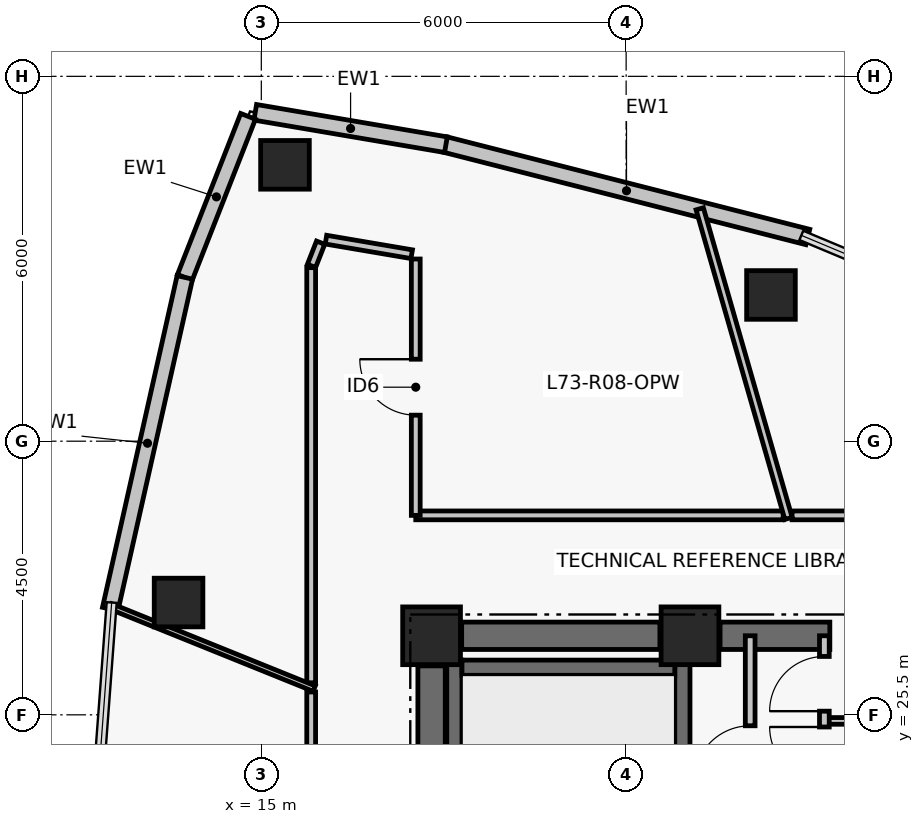
"""IFC4 building model, lengths in metres.
Left out: names, types, materials, properties, quantities, classifications, styles, units other than length and angle.
Written with IfcOpenShell. Run it as: python <this file> out.ifc"""

import sys

from ifc_helpers import new_model, si_unit, direction, frame, frame_2d, origin, origin_2d, place, context, subcontext, project, spatial, rectangle, hollow_rectangle, extrude, element, fill, save


model = new_model("IFC4")
c1 = context("Model", 3, precision=1e-05, world=origin(), true_north=direction((0.0, 1.0)))
c2 = subcontext(c1, "Body", "Model", "MODEL_VIEW")
j1 = project(units=[si_unit("LENGTHUNIT", "METRE"), si_unit("PLANEANGLEUNIT", "RADIAN")], contexts=[c1])
p1 = place(None, origin())
s1 = spatial("IfcSite", under=j1, at=p1, CompositionType="ELEMENT")
p2 = place(p1, origin())
s2 = spatial("IfcBuilding", under=s1, at=p2, CompositionType="ELEMENT")
p3 = place(p2, frame((0.0, 0.0, 288.06)))
s3 = spatial("IfcBuildingStorey", under=s2, at=p3, CompositionType="ELEMENT", Elevation=288.06)
for number, where, z_axis, x_axis in (
    (1, (17.8, 26.8, 0.0), (0.0, 0.0, 1.0), (1.0, 0.0, 0.0)),
    (2, (22.05, 26.8, 0.0), (0.0, 0.0, 1.0), (1.0, 0.0, 0.0)),
):
    element("IfcColumn", number, at=place(p3, frame(where, z_axis=z_axis, x_axis=x_axis)), inside=s3, PredefinedType="COLUMN", context=c2, shape_type="SweptSolid", body=[
        extrude(rectangle(XDim=0.95, YDim=0.95, at=origin_2d()), origin(), (0.0, 0.0, 1.0), 3.72),
    ])
p4 = place(p3, frame((18.295, 26.8, 0.0), z_axis=(0.0, 0.0, 1.0), x_axis=(1.0, 0.0, 0.0)))
e3 = element("IfcWall", 3, at=p4, inside=s3, PredefinedType="SHEAR", context=c2, shape_type="SweptSolid", body=[
    extrude(rectangle(XDim=3.26, YDim=0.45, at=frame_2d((1.63, 0.0))), origin(), (0.0, 0.0, 1.0), 3.5),
])
p5 = place(p3, frame((22.545, 26.8, 0.0), z_axis=(0.0, 0.0, 1.0), x_axis=(1.0, 0.0, 0.0)))
e4 = element("IfcWall", 4, at=p5, inside=s3, PredefinedType="SHEAR", context=c2, shape_type="SweptSolid", body=[
    extrude(rectangle(XDim=1.805, YDim=0.45, at=frame_2d((0.903, 0.0))), origin(), (0.0, 0.0, 1.0), 3.5),
])
p6 = place(p3, frame((17.8, 17.695, 0.0), z_axis=(0.0, 0.0, 1.0), x_axis=(0.0, 1.0, 0.0)))
e5 = element("IfcWall", 5, at=p6, inside=s3, PredefinedType="SHEAR", context=c2, shape_type="SweptSolid", body=[
    extrude(rectangle(XDim=8.61, YDim=0.45, at=frame_2d((4.305, 0.0))), origin(), (0.0, 0.0, 1.0), 3.5),
])
p7 = place(p3, frame((18.175, 17.6, 0.0), z_axis=(0.0, 0.0, 1.0), x_axis=(0.0, 1.0, 0.0)))
e6 = element("IfcWall", 6, at=p7, inside=s3, PredefinedType="SHEAR", context=c2, shape_type="SweptSolid", body=[
    extrude(rectangle(XDim=8.8, YDim=0.25, at=frame_2d((4.4, 0.0))), origin(), (0.0, 0.0, 1.0), 3.5),
])
p8 = place(p3, frame((21.925, 17.6, 0.0), z_axis=(0.0, 0.0, 1.0), x_axis=(0.0, 1.0, 0.0)))
e7 = element("IfcWall", 7, at=p8, inside=s3, PredefinedType="SHEAR", context=c2, shape_type="SweptSolid", body=[
    extrude(rectangle(XDim=8.8, YDim=0.25, at=frame_2d((4.4, 0.0))), origin(), (0.0, 0.0, 1.0), 3.5),
])
p9 = place(p8, frame((0.35, 0.0, 0.0)))
e8 = element("IfcOpeningElement", 8, at=p9, cuts=e7, PredefinedType="OPENING", context=c2, shape_type="SweptSolid", body=[
    extrude(rectangle(XDim=1.05, YDim=2.08, at=frame_2d((0.525, 1.04))), frame((0.0, 0.135, 0.0), z_axis=(0.0, -1.0, 0.0), x_axis=(1.0, 0.0, 0.0)), (0.0, 0.0, 1.0), 0.27),
])
p10 = place(p3, frame((18.3, 26.275, 0.0), z_axis=(0.0, 0.0, 1.0), x_axis=(1.0, 0.0, 0.0)))
e9 = element("IfcWall", 9, at=p10, inside=s3, PredefinedType="SHEAR", context=c2, shape_type="SweptSolid", body=[
    extrude(rectangle(XDim=3.5, YDim=0.25, at=frame_2d((1.75, 0.0))), origin(), (0.0, 0.0, 1.0), 3.5),
])
for number, where, z_axis, x_axis in (
    (10, (23.382, 32.405, 0.0), (0.0, 0.0, 1.0), (1.0, 0.0, 0.0)),
    (11, (15.389, 34.545, 0.0), (0.0, 0.0, 1.0), (1.0, 0.0, 0.0)),
    (12, (13.639, 27.347, 0.0), (0.0, 0.0, 1.0), (1.0, 0.0, 0.0)),
):
    element("IfcColumn", number, at=place(p3, frame(where, z_axis=z_axis, x_axis=x_axis)), inside=s3, PredefinedType="COLUMN", context=c2, shape_type="SweptSolid", body=[
        extrude(hollow_rectangle(XDim=0.8, YDim=0.8, WallThickness=0.035, at=origin_2d()), origin(), (0.0, 0.0, 1.0), 3.72),
    ])
p11 = place(p3, frame((18.024, 34.879, 0.0), z_axis=(0.0, 0.0, 1.0), x_axis=(0.968988278672, -0.247106689096, 0.0)))
e13 = element("IfcWall", 13, at=p11, inside=s3, PredefinedType="PARTITIONING", context=c2, shape_type="SweptSolid", body=[
    extrude(rectangle(XDim=6.154, YDim=0.26, at=frame_2d((3.077, 0.0))), origin(), (0.0, 0.0, 1.0), 3.5),
])
p12 = place(p3, frame((14.9, 35.409, 0.0), z_axis=(0.0, 0.0, 1.0), x_axis=(0.985889432766, -0.167397808709, 0.0)))
e14 = element("IfcWall", 14, at=p12, inside=s3, PredefinedType="PARTITIONING", context=c2, shape_type="SweptSolid", body=[
    extrude(rectangle(XDim=3.181, YDim=0.26, at=frame_2d((1.59, 0.0))), origin(), (0.0, 0.0, 1.0), 3.5),
])
p13 = place(p3, frame((13.742, 32.693, 0.0), z_axis=(0.0, 0.0, 1.0), x_axis=(0.36559927932, 0.930772349697, 0.0)))
e15 = element("IfcWall", 15, at=p13, inside=s3, PredefinedType="PARTITIONING", context=c2, shape_type="SweptSolid", body=[
    extrude(rectangle(XDim=2.845, YDim=0.26, at=frame_2d((1.423, 0.0))), origin(), (0.0, 0.0, 1.0), 3.5),
])
p14 = place(p3, frame((12.515, 27.24, 0.0), z_axis=(0.0, 0.0, 1.0), x_axis=(0.219500763731, 0.97561232809, 0.0)))
e16 = element("IfcWall", 16, at=p14, inside=s3, PredefinedType="PARTITIONING", context=c2, shape_type="SweptSolid", body=[
    extrude(rectangle(XDim=5.59, YDim=0.26, at=frame_2d((2.795, 0.0))), origin(), (0.0, 0.0, 1.0), 3.5),
])
p15 = place(p3, frame((23.04, 23.5, 0.0), z_axis=(0.0, 0.0, 1.0), x_axis=(0.0, 1.0, 0.0)))
e17 = element("IfcWall", 17, at=p15, inside=s3, PredefinedType="PARTITIONING", context=c2, shape_type="SweptSolid", body=[
    extrude(rectangle(XDim=3.3, YDim=0.16, at=frame_2d((1.65, 0.0))), origin(), (0.0, 0.0, 1.0), 2.63),
])
p16 = place(p15, frame((0.9, 0.0, 0.0)))
e18 = element("IfcOpeningElement", 18, at=p16, cuts=e17, PredefinedType="OPENING", context=c2, shape_type="SweptSolid", body=[
    extrude(rectangle(XDim=0.92, YDim=2.05, at=frame_2d((0.46, 1.025))), frame((0.0, 0.09, 0.0), z_axis=(0.0, -1.0, 0.0), x_axis=(1.0, 0.0, 0.0)), (0.0, 0.0, 1.0), 0.18),
])
p17 = place(p3, frame((24.26, 25.4, 0.0), z_axis=(0.0, 0.0, 1.0), x_axis=(1.0, 0.0, 0.0)))
e19 = element("IfcWall", 19, at=p17, inside=s3, PredefinedType="PARTITIONING", context=c2, shape_type="SweptSolid", body=[
    extrude(rectangle(XDim=4.76, YDim=0.11, at=frame_2d((2.38, 0.0))), origin(), (0.0, 0.0, 1.0), 3.5),
])
p18 = place(p3, frame((24.26, 24.24, 0.0), z_axis=(0.0, 0.0, 1.0), x_axis=(0.0, 1.0, 0.0)))
e20 = element("IfcWall", 20, at=p18, inside=s3, PredefinedType="PARTITIONING", context=c2, shape_type="SweptSolid", body=[
    extrude(rectangle(XDim=2.56, YDim=0.16, at=frame_2d((1.28, 0.0))), origin(), (0.0, 0.0, 1.0), 2.63),
])
p19 = place(p18, frame((0.16, 0.0, 0.0)))
e21 = element("IfcOpeningElement", 21, at=p19, cuts=e20, PredefinedType="OPENING", context=c2, shape_type="SweptSolid", body=[
    extrude(rectangle(XDim=0.9, YDim=2.02, at=frame_2d((0.45, 1.01))), frame((0.0, 0.09, 0.0), z_axis=(0.0, -1.0, 0.0), x_axis=(1.0, 0.0, 0.0)), (0.0, 0.0, 1.0), 0.18),
])
p20 = place(p18, frame((1.32, 0.0, 0.0)))
e22 = element("IfcOpeningElement", 22, at=p20, cuts=e20, PredefinedType="OPENING", context=c2, shape_type="SweptSolid", body=[
    extrude(rectangle(XDim=0.9, YDim=2.02, at=frame_2d((0.45, 1.01))), frame((0.0, 0.09, 0.0), z_axis=(0.0, -1.0, 0.0), x_axis=(1.0, 0.0, 0.0)), (0.0, 0.0, 1.0), 0.18),
])
p21 = place(p3, frame((15.82, 25.876, 0.0), z_axis=(0.0, 0.0, 1.0), x_axis=(0.0, -1.0, 0.0)))
e23 = element("IfcWall", 23, at=p21, inside=s3, PredefinedType="PARTITIONING", context=c2, shape_type="SweptSolid", body=[
    extrude(rectangle(XDim=9.442, YDim=0.145, at=frame_2d((4.721, 0.0))), origin(), (0.0, 0.0, 1.0), 2.83),
])
p22 = place(p21, frame((3.254, 0.0, 0.0)))
e24 = element("IfcOpeningElement", 24, at=p22, cuts=e23, PredefinedType="OPENING", context=c2, shape_type="SweptSolid", body=[
    extrude(rectangle(XDim=0.95, YDim=2.06, at=frame_2d((0.475, 1.03))), frame((0.0, 0.083, 0.0), z_axis=(0.0, -1.0, 0.0), x_axis=(1.0, 0.0, 0.0)), (0.0, 0.0, 1.0), 0.165),
])
p23 = place(p3, frame((28.5, 28.78, 0.0), z_axis=(0.0, 0.0, 1.0), x_axis=(-1.0, 0.0, 0.0)))
e25 = element("IfcWall", 25, at=p23, inside=s3, PredefinedType="PARTITIONING", context=c2, shape_type="SweptSolid", body=[
    extrude(rectangle(XDim=4.771, YDim=0.145, at=frame_2d((2.386, 0.0))), origin(), (0.0, 0.0, 1.0), 3.5),
])
p24 = place(p23, frame((2.318, 0.0, 0.0)))
e26 = element("IfcOpeningElement", 26, at=p24, cuts=e25, PredefinedType="OPENING", context=c2, shape_type="SweptSolid", body=[
    extrude(rectangle(XDim=0.95, YDim=2.06, at=frame_2d((0.475, 1.03))), frame((0.0, 0.083, 0.0), z_axis=(0.0, -1.0, 0.0), x_axis=(1.0, 0.0, 0.0)), (0.0, 0.0, 1.0), 0.165),
])
p25 = place(p3, frame((23.583, 28.78, 0.0), z_axis=(0.0, 0.0, 1.0), x_axis=(-1.0, 0.0, 0.0)))
e27 = element("IfcWall", 27, at=p25, inside=s3, PredefinedType="PARTITIONING", context=c2, shape_type="SweptSolid", body=[
    extrude(rectangle(XDim=6.043, YDim=0.145, at=frame_2d((3.021, 0.0))), origin(), (0.0, 0.0, 1.0), 2.83),
])
p26 = place(p3, frame((17.54, 28.78, 0.0), z_axis=(0.0, 0.0, 1.0), x_axis=(0.0, 1.0, 0.0)))
e28 = element("IfcWall", 28, at=p26, inside=s3, PredefinedType="PARTITIONING", context=c2, shape_type="SweptSolid", body=[
    extrude(rectangle(XDim=4.216, YDim=0.145, at=frame_2d((2.108, 0.0))), origin(), (0.0, 0.0, 1.0), 3.13),
])
p27 = place(p26, frame((1.648, 0.0, 0.0)))
e29 = element("IfcOpeningElement", 29, at=p27, cuts=e28, PredefinedType="OPENING", context=c2, shape_type="SweptSolid", body=[
    extrude(rectangle(XDim=0.92, YDim=2.05, at=frame_2d((0.46, 1.025))), frame((0.0, 0.083, 0.0), z_axis=(0.0, -1.0, 0.0), x_axis=(1.0, 0.0, 0.0)), (0.0, 0.0, 1.0), 0.165),
])
p28 = place(p3, frame((17.473, 33.075, 0.0), z_axis=(0.0, 0.0, 1.0), x_axis=(-0.985881780308, 0.167442871621, 0.0)))
e30 = element("IfcWall", 30, at=p28, inside=s3, PredefinedType="PARTITIONING", context=c2, shape_type="SweptSolid", body=[
    extrude(rectangle(XDim=1.43, YDim=0.145, at=frame_2d((0.715, 0.0))), origin(), (0.0, 0.0, 1.0), 3.13),
])
p29 = place(p3, frame((15.975, 33.265, 0.0), z_axis=(0.0, 0.0, 1.0), x_axis=(-0.365633948196, -0.930758731319, 0.0)))
e31 = element("IfcWall", 31, at=p29, inside=s3, PredefinedType="PARTITIONING", context=c2, shape_type="SweptSolid", body=[
    extrude(rectangle(XDim=0.41, YDim=0.145, at=frame_2d((0.205, 0.0))), origin(), (0.0, 0.0, 1.0), 2.83),
])
p30 = place(p3, frame((15.82, 32.854, 0.0), z_axis=(0.0, 0.0, 1.0), x_axis=(0.0, -1.0, 0.0)))
e32 = element("IfcWall", 32, at=p30, inside=s3, PredefinedType="PARTITIONING", context=c2, shape_type="SweptSolid", body=[
    extrude(rectangle(XDim=6.827, YDim=0.145, at=frame_2d((3.414, 0.0))), origin(), (0.0, 0.0, 1.0), 2.83),
])
p31 = place(p3, frame((23.67, 28.73, 0.0), z_axis=(0.0, 0.0, 1.0), x_axis=(-0.275646373744, 0.961259110044, 0.0)))
e33 = element("IfcWall", 33, at=p31, inside=s3, PredefinedType="PARTITIONING", context=c2, shape_type="SweptSolid", body=[
    extrude(rectangle(XDim=5.296, YDim=0.125, at=frame_2d((2.648, 0.0))), origin(), (0.0, 0.0, 1.0), 2.83),
])
p32 = place(p3, frame((15.87, 25.931, 0.0), z_axis=(0.0, 0.0, 1.0), x_axis=(-0.92718807063, 0.374596158123, 0.0)))
e34 = element("IfcWall", 34, at=p32, inside=s3, PredefinedType="PARTITIONING", context=c2, shape_type="SweptSolid", body=[
    extrude(rectangle(XDim=3.609, YDim=0.095, at=frame_2d((1.804, 0.0))), origin(), (0.0, 0.0, 1.0), 2.98),
])
p33 = place(p16, origin())
e35 = element("IfcDoor", 35, at=p33, inside=s3, OperationType="SINGLE_SWING_LEFT", PredefinedType="DOOR", context=c2, shape_type="SweptSolid", body=[
    extrude(rectangle(XDim=0.92, YDim=2.05, at=frame_2d((0.46, 1.025))), frame((0.0, 0.025, 0.0), z_axis=(0.0, -1.0, 0.0), x_axis=(1.0, 0.0, 0.0)), (0.0, 0.0, 1.0), 0.05),
])
fill(e18, e35)
p34 = place(p19, origin())
e36 = element("IfcDoor", 36, at=p34, inside=s3, OperationType="SINGLE_SWING_RIGHT", PredefinedType="DOOR", context=c2, shape_type="SweptSolid", body=[
    extrude(rectangle(XDim=0.9, YDim=2.02, at=frame_2d((0.45, 1.01))), frame((0.0, 0.025, 0.0), z_axis=(0.0, -1.0, 0.0), x_axis=(1.0, 0.0, 0.0)), (0.0, 0.0, 1.0), 0.05),
])
fill(e21, e36)
p35 = place(p20, origin())
e37 = element("IfcDoor", 37, at=p35, inside=s3, OperationType="SINGLE_SWING_LEFT", PredefinedType="DOOR", context=c2, shape_type="SweptSolid", body=[
    extrude(rectangle(XDim=0.9, YDim=2.02, at=frame_2d((0.45, 1.01))), frame((0.0, 0.025, 0.0), z_axis=(0.0, -1.0, 0.0), x_axis=(1.0, 0.0, 0.0)), (0.0, 0.0, 1.0), 0.05),
])
fill(e22, e37)
p36 = place(p27, origin())
e38 = element("IfcDoor", 38, at=p36, inside=s3, OperationType="SINGLE_SWING_RIGHT", PredefinedType="DOOR", context=c2, shape_type="SweptSolid", body=[
    extrude(rectangle(XDim=0.92, YDim=2.05, at=frame_2d((0.46, 1.025))), frame((0.0, 0.025, 0.0), z_axis=(0.0, -1.0, 0.0), x_axis=(1.0, 0.0, 0.0)), (0.0, 0.0, 1.0), 0.05),
])
fill(e29, e38)
save(model, sys.argv[1])
